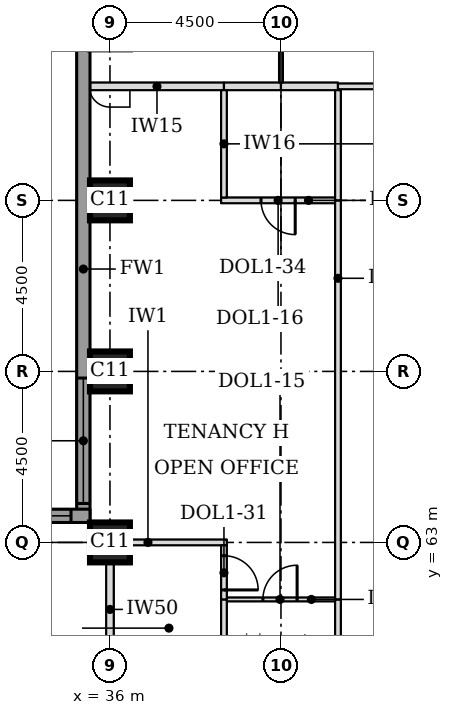
"""IFC4 building model, lengths in metres.
Left out: names, types, materials, properties, quantities, classifications, styles, units other than length and angle.
Written with IfcOpenShell. Run it as: python <this file> out.ifc"""

import sys

from ifc_helpers import new_model, si_unit, direction, frame, frame_2d, origin, origin_2d, place, context, subcontext, project, spatial, rectangle, extrude, element, fill, save


model = new_model("IFC4")
c1 = context("Model", 3, precision=1e-05, world=origin(), true_north=direction((0.0, 1.0)))
c2 = subcontext(c1, "Body", "Model", "MODEL_VIEW")
j1 = project(units=[si_unit("LENGTHUNIT", "METRE"), si_unit("PLANEANGLEUNIT", "RADIAN")], contexts=[c1])
p1 = place(None, origin())
s1 = spatial("IfcSite", under=j1, at=p1, CompositionType="ELEMENT")
p2 = place(p1, origin())
s2 = spatial("IfcBuilding", under=s1, at=p2, CompositionType="ELEMENT")
p3 = place(p2, frame((0.0, 0.0, 78.9)))
s3 = spatial("IfcBuildingStorey", under=s2, at=p3, CompositionType="ELEMENT", Elevation=78.9)
for number, where, z_axis, x_axis in (
    (1, (36.0, 63.0, 0.0), (0.0, 0.0, 1.0), (1.0, 0.0, 0.0)),
    (2, (36.0, 67.5, 0.0), (0.0, 0.0, 1.0), (1.0, 0.0, 0.0)),
    (3, (36.0, 72.0, 0.0), (0.0, 0.0, 1.0), (1.0, 0.0, 0.0)),
):
    element("IfcColumn", number, at=place(p3, frame(where, z_axis=z_axis, x_axis=x_axis)), inside=s3, PredefinedType="COLUMN", context=c2, shape_type="SweptSolid", body=[
        extrude(rectangle(XDim=1.05, YDim=1.05, at=origin_2d()), origin(), (0.0, 0.0, 1.0), 3.7),
    ])
p4 = place(p3, frame((35.3, 76.862, 0.0), z_axis=(0.0, 0.0, 1.0), x_axis=(0.0, -1.0, 0.0)))
e4 = element("IfcWall", 4, at=p4, inside=s3, PredefinedType="STANDARD", context=c2, shape_type="SweptSolid", body=[
    extrude(rectangle(XDim=13.337, YDim=0.35, at=frame_2d((6.669, 0.0))), origin(), (0.0, 0.0, 1.0), 3.525),
])
p5 = place(p4, frame((9.537, 0.0, 0.9)))
e5 = element("IfcOpeningElement", 5, at=p5, cuts=e4, PredefinedType="OPENING", context=c2, shape_type="SweptSolid", body=[
    extrude(rectangle(XDim=3.3, YDim=1.9, at=frame_2d((1.65, 0.95))), frame((0.0, 0.185, 0.0), z_axis=(0.0, -1.0, 0.0), x_axis=(1.0, 0.0, 0.0)), (0.0, 0.0, 1.0), 0.37),
])
p6 = place(p3, frame((35.475, 63.7, 0.0), z_axis=(0.0, 0.0, 1.0), x_axis=(-1.0, 0.0, 0.0)))
e6 = element("IfcWall", 6, at=p6, inside=s3, PredefinedType="STANDARD", context=c2, shape_type="SweptSolid", body=[
    extrude(rectangle(XDim=17.837, YDim=0.35, at=frame_2d((8.919, 0.0))), origin(), (0.0, 0.0, 1.0), 3.525),
])
p7 = place(p6, frame((0.5, 0.0, 0.9)))
e7 = element("IfcOpeningElement", 7, at=p7, cuts=e6, PredefinedType="OPENING", context=c2, shape_type="SweptSolid", body=[
    extrude(rectangle(XDim=3.3, YDim=1.9, at=frame_2d((1.65, 0.95))), frame((0.0, 0.185, 0.0), z_axis=(0.0, -1.0, 0.0), x_axis=(1.0, 0.0, 0.0)), (0.0, 0.0, 1.0), 0.37),
])
p8 = place(p6, frame((9.075, 0.0, 0.9)))
e8 = element("IfcOpeningElement", 8, at=p8, cuts=e6, PredefinedType="OPENING", context=c2, shape_type="SweptSolid", body=[
    extrude(rectangle(XDim=3.3, YDim=1.9, at=frame_2d((1.65, 0.95))), frame((0.0, 0.185, 0.0), z_axis=(0.0, -1.0, 0.0), x_axis=(1.0, 0.0, 0.0)), (0.0, 0.0, 1.0), 0.37),
])
p9 = place(p3, frame((39.075, 61.5, 0.0), z_axis=(0.0, 0.0, 1.0), x_axis=(1.0, 0.0, 0.0)))
e9 = element("IfcWall", 9, at=p9, inside=s3, PredefinedType="PARTITIONING", context=c2, shape_type="SweptSolid", body=[
    extrude(rectangle(XDim=2.85, YDim=0.1, at=frame_2d((1.425, 0.0))), origin(), (0.0, 0.0, 1.0), 3.55),
])
p10 = place(p9, frame((0.95, 0.0, 0.0)))
e10 = element("IfcOpeningElement", 10, at=p10, cuts=e9, PredefinedType="OPENING", context=c2, shape_type="SweptSolid", body=[
    extrude(rectangle(XDim=0.9, YDim=2.1, at=frame_2d((0.45, 1.05))), frame((0.0, 0.06, 0.0), z_axis=(0.0, -1.0, 0.0), x_axis=(1.0, 0.0, 0.0)), (0.0, 0.0, 1.0), 0.12),
])
p11 = place(p3, frame((36.525, 63.0, 0.0), z_axis=(0.0, 0.0, 1.0), x_axis=(1.0, 0.0, 0.0)))
e11 = element("IfcWall", 11, at=p11, inside=s3, PredefinedType="PARTITIONING", context=c2, shape_type="SweptSolid", body=[
    extrude(rectangle(XDim=2.55, YDim=0.15, at=frame_2d((1.275, 0.0))), origin(), (0.0, 0.0, 1.0), 3.55),
])
p12 = place(p3, frame((38.925, 72.0, 0.0), z_axis=(0.0, 0.0, 1.0), x_axis=(1.0, 0.0, 0.0)))
e12 = element("IfcWall", 12, at=p12, inside=s3, PredefinedType="PARTITIONING", context=c2, shape_type="SweptSolid", body=[
    extrude(rectangle(XDim=3.0, YDim=0.15, at=frame_2d((1.5, 0.0))), origin(), (0.0, 0.0, 1.0), 3.55),
])
p13 = place(p12, frame((1.05, 0.0, 0.0)))
e13 = element("IfcOpeningElement", 13, at=p13, cuts=e12, PredefinedType="OPENING", context=c2, shape_type="SweptSolid", body=[
    extrude(rectangle(XDim=0.9, YDim=2.1, at=frame_2d((0.45, 1.05))), frame((0.0, 0.085, 0.0), z_axis=(0.0, -1.0, 0.0), x_axis=(1.0, 0.0, 0.0)), (0.0, 0.0, 1.0), 0.17),
])
p14 = place(p3, frame((35.475, 75.0, 0.0), z_axis=(0.0, 0.0, 1.0), x_axis=(1.0, 0.0, 0.0)))
e14 = element("IfcWall", 14, at=p14, inside=s3, PredefinedType="PARTITIONING", context=c2, shape_type="SweptSolid", body=[
    extrude(rectangle(XDim=3.525, YDim=0.2, at=frame_2d((1.762, 0.0))), origin(), (0.0, 0.0, 1.0), 3.55),
])
for number, where, z_axis, x_axis in (
    (15, (39.0, 75.0, 0.0), (0.0, 0.0, 1.0), (1.0, 0.0, 0.0)),
    (16, (40.5, 75.0, 0.0), (0.0, 0.0, 1.0), (1.0, 0.0, 0.0)),
):
    element("IfcWall", number, at=place(p3, frame(where, z_axis=z_axis, x_axis=x_axis)), inside=s3, PredefinedType="PARTITIONING", context=c2, shape_type="SweptSolid", body=[
        extrude(rectangle(XDim=1.5, YDim=0.2, at=frame_2d((0.75, 0.0))), origin(), (0.0, 0.0, 1.0), 3.55),
    ])
p15 = place(p3, frame((42.0, 75.0, 0.0), z_axis=(0.0, 0.0, 1.0), x_axis=(1.0, 0.0, 0.0)))
e17 = element("IfcWall", 17, at=p15, inside=s3, PredefinedType="PARTITIONING", context=c2, shape_type="SweptSolid", body=[
    extrude(rectangle(XDim=4.5, YDim=0.15, at=frame_2d((2.25, 0.0))), origin(), (0.0, 0.0, 1.0), 3.55),
])
p16 = place(p15, frame((1.75, 0.0, 0.0)))
e18 = element("IfcOpeningElement", 18, at=p16, cuts=e17, PredefinedType="OPENING", context=c2, shape_type="SweptSolid", body=[
    extrude(rectangle(XDim=1.0, YDim=2.1, at=frame_2d((0.5, 1.05))), frame((0.0, 0.085, 0.0), z_axis=(0.0, -1.0, 0.0), x_axis=(1.0, 0.0, 0.0)), (0.0, 0.0, 1.0), 0.17),
])
p17 = place(p3, frame((42.0, 57.075, 0.0), z_axis=(0.0, 0.0, 1.0), x_axis=(0.0, 1.0, 0.0)))
e19 = element("IfcWall", 19, at=p17, inside=s3, PredefinedType="PARTITIONING", context=c2, shape_type="SweptSolid", body=[
    extrude(rectangle(XDim=4.425, YDim=0.15, at=frame_2d((2.212, 0.0))), origin(), (0.0, 0.0, 1.0), 3.55),
])
p18 = place(p17, frame((1.7, 0.0, 0.0)))
e20 = element("IfcOpeningElement", 20, at=p18, cuts=e19, PredefinedType="OPENING", context=c2, shape_type="SweptSolid", body=[
    extrude(rectangle(XDim=1.0, YDim=2.1, at=frame_2d((0.5, 1.05))), frame((0.0, 0.085, 0.0), z_axis=(0.0, -1.0, 0.0), x_axis=(1.0, 0.0, 0.0)), (0.0, 0.0, 1.0), 0.17),
])
p19 = place(p3, frame((39.0, 58.575, 0.0), z_axis=(0.0, 0.0, 1.0), x_axis=(0.0, 1.0, 0.0)))
e21 = element("IfcWall", 21, at=p19, inside=s3, PredefinedType="PARTITIONING", context=c2, shape_type="SweptSolid", body=[
    extrude(rectangle(XDim=2.925, YDim=0.15, at=frame_2d((1.462, 0.0))), origin(), (0.0, 0.0, 1.0), 3.55),
])
p20 = place(p3, frame((36.0, 60.0, 0.0), z_axis=(0.0, 0.0, 1.0), x_axis=(0.0, 1.0, 0.0)))
e22 = element("IfcWall", 22, at=p20, inside=s3, PredefinedType="PARTITIONING", context=c2, shape_type="SweptSolid", body=[
    extrude(rectangle(XDim=2.475, YDim=0.2, at=frame_2d((1.238, 0.0))), origin(), (0.0, 0.0, 1.0), 2.8),
])
p21 = place(p3, frame((39.0, 61.5, 0.0), z_axis=(0.0, 0.0, 1.0), x_axis=(0.0, 1.0, 0.0)))
e23 = element("IfcWall", 23, at=p21, inside=s3, PredefinedType="PARTITIONING", context=c2, shape_type="SweptSolid", body=[
    extrude(rectangle(XDim=1.425, YDim=0.15, at=frame_2d((0.712, 0.0))), origin(), (0.0, 0.0, 1.0), 3.55),
])
p22 = place(p21, frame((0.25, 0.0, 0.0)))
e24 = element("IfcOpeningElement", 24, at=p22, cuts=e23, PredefinedType="OPENING", context=c2, shape_type="SweptSolid", body=[
    extrude(rectangle(XDim=0.9, YDim=2.1, at=frame_2d((0.45, 1.05))), frame((0.0, 0.085, 0.0), z_axis=(0.0, -1.0, 0.0), x_axis=(1.0, 0.0, 0.0)), (0.0, 0.0, 1.0), 0.17),
])
p23 = place(p3, frame((42.0, 61.5, 0.0), z_axis=(0.0, 0.0, 1.0), x_axis=(0.0, 1.0, 0.0)))
e25 = element("IfcWall", 25, at=p23, inside=s3, PredefinedType="PARTITIONING", context=c2, shape_type="SweptSolid", body=[
    extrude(rectangle(XDim=10.5, YDim=0.15, at=frame_2d((5.25, 0.0))), origin(), (0.0, 0.0, 1.0), 3.55),
])
p24 = place(p3, frame((42.0, 72.0, 0.0), z_axis=(0.0, 0.0, 1.0), x_axis=(0.0, 1.0, 0.0)))
e26 = element("IfcWall", 26, at=p24, inside=s3, PredefinedType="PARTITIONING", context=c2, shape_type="SweptSolid", body=[
    extrude(rectangle(XDim=2.9, YDim=0.15, at=frame_2d((1.45, 0.0))), origin(), (0.0, 0.0, 1.0), 3.55),
])
p25 = place(p3, frame((39.0, 72.075, 0.0), z_axis=(0.0, 0.0, 1.0), x_axis=(0.0, 1.0, 0.0)))
e27 = element("IfcWall", 27, at=p25, inside=s3, PredefinedType="PARTITIONING", context=c2, shape_type="SweptSolid", body=[
    extrude(rectangle(XDim=2.825, YDim=0.15, at=frame_2d((1.413, 0.0))), origin(), (0.0, 0.0, 1.0), 3.55),
])
p26 = place(p3, frame((40.5, 75.1, 0.0), z_axis=(0.0, 0.0, 1.0), x_axis=(0.0, 1.0, 0.0)))
e28 = element("IfcWall", 28, at=p26, inside=s3, PredefinedType="PARTITIONING", context=c2, shape_type="SweptSolid", body=[
    extrude(rectangle(XDim=2.9, YDim=0.1, at=frame_2d((1.45, 0.0))), origin(), (0.0, 0.0, 1.0), 3.55),
])
p27 = place(p26, frame((1.0, 0.0, 0.0)))
e29 = element("IfcOpeningElement", 29, at=p27, cuts=e28, PredefinedType="OPENING", context=c2, shape_type="SweptSolid", body=[
    extrude(rectangle(XDim=0.9, YDim=2.1, at=frame_2d((0.45, 1.05))), frame((0.0, 0.06, 0.0), z_axis=(0.0, -1.0, 0.0), x_axis=(1.0, 0.0, 0.0)), (0.0, 0.0, 1.0), 0.12),
])
p28 = place(p5, origin())
e30 = element("IfcWindow", 30, at=p28, inside=s3, PartitioningType="SINGLE_PANEL", PredefinedType="WINDOW", context=c2, shape_type="SweptSolid", body=[
    extrude(rectangle(XDim=3.3, YDim=1.9, at=frame_2d((1.65, 0.95))), frame((0.0, 0.085, 0.0), z_axis=(0.0, -1.0, 0.0), x_axis=(1.0, 0.0, 0.0)), (0.0, 0.0, 1.0), 0.06),
])
fill(e5, e30)
p29 = place(p7, origin())
e31 = element("IfcWindow", 31, at=p29, inside=s3, PartitioningType="SINGLE_PANEL", PredefinedType="WINDOW", context=c2, shape_type="SweptSolid", body=[
    extrude(rectangle(XDim=3.3, YDim=1.9, at=frame_2d((1.65, 0.95))), frame((0.0, 0.085, 0.0), z_axis=(0.0, -1.0, 0.0), x_axis=(1.0, 0.0, 0.0)), (0.0, 0.0, 1.0), 0.06),
])
fill(e7, e31)
p30 = place(p10, origin())
e32 = element("IfcDoor", 32, at=p30, inside=s3, OperationType="SINGLE_SWING_RIGHT", PredefinedType="DOOR", context=c2, shape_type="SweptSolid", body=[
    extrude(rectangle(XDim=0.9, YDim=2.1, at=frame_2d((0.45, 1.05))), frame((0.0, 0.025, 0.0), z_axis=(0.0, -1.0, 0.0), x_axis=(1.0, 0.0, 0.0)), (0.0, 0.0, 1.0), 0.05),
])
fill(e10, e32)
p31 = place(p13, frame((0.9, 0.0, 0.0), z_axis=(0.0, 0.0, 1.0), x_axis=(-1.0, 0.0, 0.0)))
e33 = element("IfcDoor", 33, at=p31, inside=s3, OperationType="SINGLE_SWING_LEFT", PredefinedType="DOOR", context=c2, shape_type="SweptSolid", body=[
    extrude(rectangle(XDim=0.9, YDim=2.1, at=frame_2d((0.45, 1.05))), frame((0.0, 0.025, 0.0), z_axis=(0.0, -1.0, 0.0), x_axis=(1.0, 0.0, 0.0)), (0.0, 0.0, 1.0), 0.05),
])
fill(e13, e33)
p32 = place(p22, frame((0.9, 0.0, 0.0), z_axis=(0.0, 0.0, 1.0), x_axis=(-1.0, 0.0, 0.0)))
e34 = element("IfcDoor", 34, at=p32, inside=s3, OperationType="SINGLE_SWING_RIGHT", PredefinedType="DOOR", context=c2, shape_type="SweptSolid", body=[
    extrude(rectangle(XDim=0.9, YDim=2.1, at=frame_2d((0.45, 1.05))), frame((0.0, 0.025, 0.0), z_axis=(0.0, -1.0, 0.0), x_axis=(1.0, 0.0, 0.0)), (0.0, 0.0, 1.0), 0.05),
])
fill(e24, e34)
save(model, sys.argv[1])
